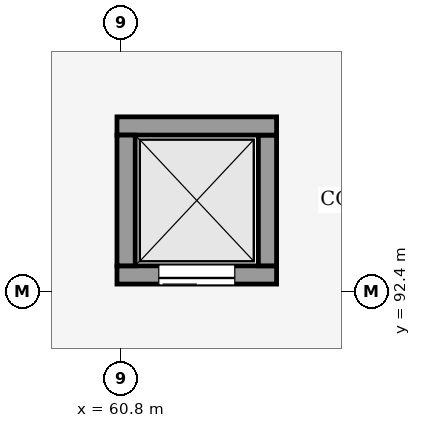
"""IFC4 building model, lengths in metres.
Left out: names, types, materials, properties, quantities, classifications, styles, units other than length and angle.
Written with IfcOpenShell. Run it as: python <this file> out.ifc"""

import sys

from ifc_helpers import new_model, si_unit, direction, frame, frame_2d, origin, place, context, subcontext, project, spatial, rectangle, extrude, element, fill, save


model = new_model("IFC4")
c1 = context("Model", 3, precision=1e-05, world=origin(), true_north=direction((0.0, 1.0)))
c2 = subcontext(c1, "Body", "Model", "MODEL_VIEW")
j1 = project(units=[si_unit("LENGTHUNIT", "METRE"), si_unit("PLANEANGLEUNIT", "RADIAN")], contexts=[c1])
p1 = place(None, origin())
s1 = spatial("IfcSite", under=j1, at=p1, CompositionType="ELEMENT")
p2 = place(p1, origin())
s2 = spatial("IfcBuilding", under=s1, at=p2, CompositionType="ELEMENT")
p3 = place(p2, frame((0.0, 0.0, 5.1)))
s3 = spatial("IfcBuildingStorey", under=s2, at=p3, CompositionType="ELEMENT", Elevation=5.1)
p4 = place(p3, frame((62.85, 92.62, 0.0), z_axis=(0.0, 0.0, 1.0), x_axis=(-1.0, 0.0, 0.0)))
e1 = element("IfcWall", 1, at=p4, inside=s3, PredefinedType="SHEAR", context=c2, shape_type="SweptSolid", body=[
    extrude(rectangle(XDim=2.1, YDim=0.24, at=frame_2d((1.05, 0.0))), origin(), (0.0, 0.0, 1.0), 4.05),
])
p5 = place(p4, frame((0.55, 0.0, 0.0)))
e2 = element("IfcOpeningElement", 2, at=p5, cuts=e1, PredefinedType="OPENING", context=c2, shape_type="SweptSolid", body=[
    extrude(rectangle(XDim=1.0, YDim=2.15, at=frame_2d((0.5, 1.075))), frame((0.0, 0.13, 0.0), z_axis=(0.0, -1.0, 0.0), x_axis=(1.0, 0.0, 0.0)), (0.0, 0.0, 1.0), 0.26),
])
p6 = place(p3, frame((62.73, 94.46, 0.0), z_axis=(0.0, 0.0, 1.0), x_axis=(0.0, -1.0, 0.0)))
e3 = element("IfcWall", 3, at=p6, inside=s3, PredefinedType="SHEAR", context=c2, shape_type="SweptSolid", body=[
    extrude(rectangle(XDim=1.72, YDim=0.24, at=frame_2d((0.86, 0.0))), origin(), (0.0, 0.0, 1.0), 4.05),
])
p7 = place(p3, frame((60.75, 94.58, 0.0), z_axis=(0.0, 0.0, 1.0), x_axis=(1.0, 0.0, 0.0)))
e4 = element("IfcWall", 4, at=p7, inside=s3, PredefinedType="SHEAR", context=c2, shape_type="SweptSolid", body=[
    extrude(rectangle(XDim=2.1, YDim=0.24, at=frame_2d((1.05, 0.0))), origin(), (0.0, 0.0, 1.0), 4.05),
])
p8 = place(p3, frame((60.87, 92.74, 0.0), z_axis=(0.0, 0.0, 1.0), x_axis=(0.0, 1.0, 0.0)))
e5 = element("IfcWall", 5, at=p8, inside=s3, PredefinedType="SHEAR", context=c2, shape_type="SweptSolid", body=[
    extrude(rectangle(XDim=1.72, YDim=0.24, at=frame_2d((0.86, 0.0))), origin(), (0.0, 0.0, 1.0), 4.05),
])
p9 = place(p5, origin())
e6 = element("IfcDoor", 6, at=p9, inside=s3, OperationType="SLIDING_TO_RIGHT", PredefinedType="DOOR", context=c2, shape_type="SweptSolid", body=[
    extrude(rectangle(XDim=1.0, YDim=2.15, at=frame_2d((0.5, 1.075))), frame((0.0, 0.025, 0.0), z_axis=(0.0, -1.0, 0.0), x_axis=(1.0, 0.0, 0.0)), (0.0, 0.0, 1.0), 0.05),
])
fill(e2, e6)
save(model, sys.argv[1])
